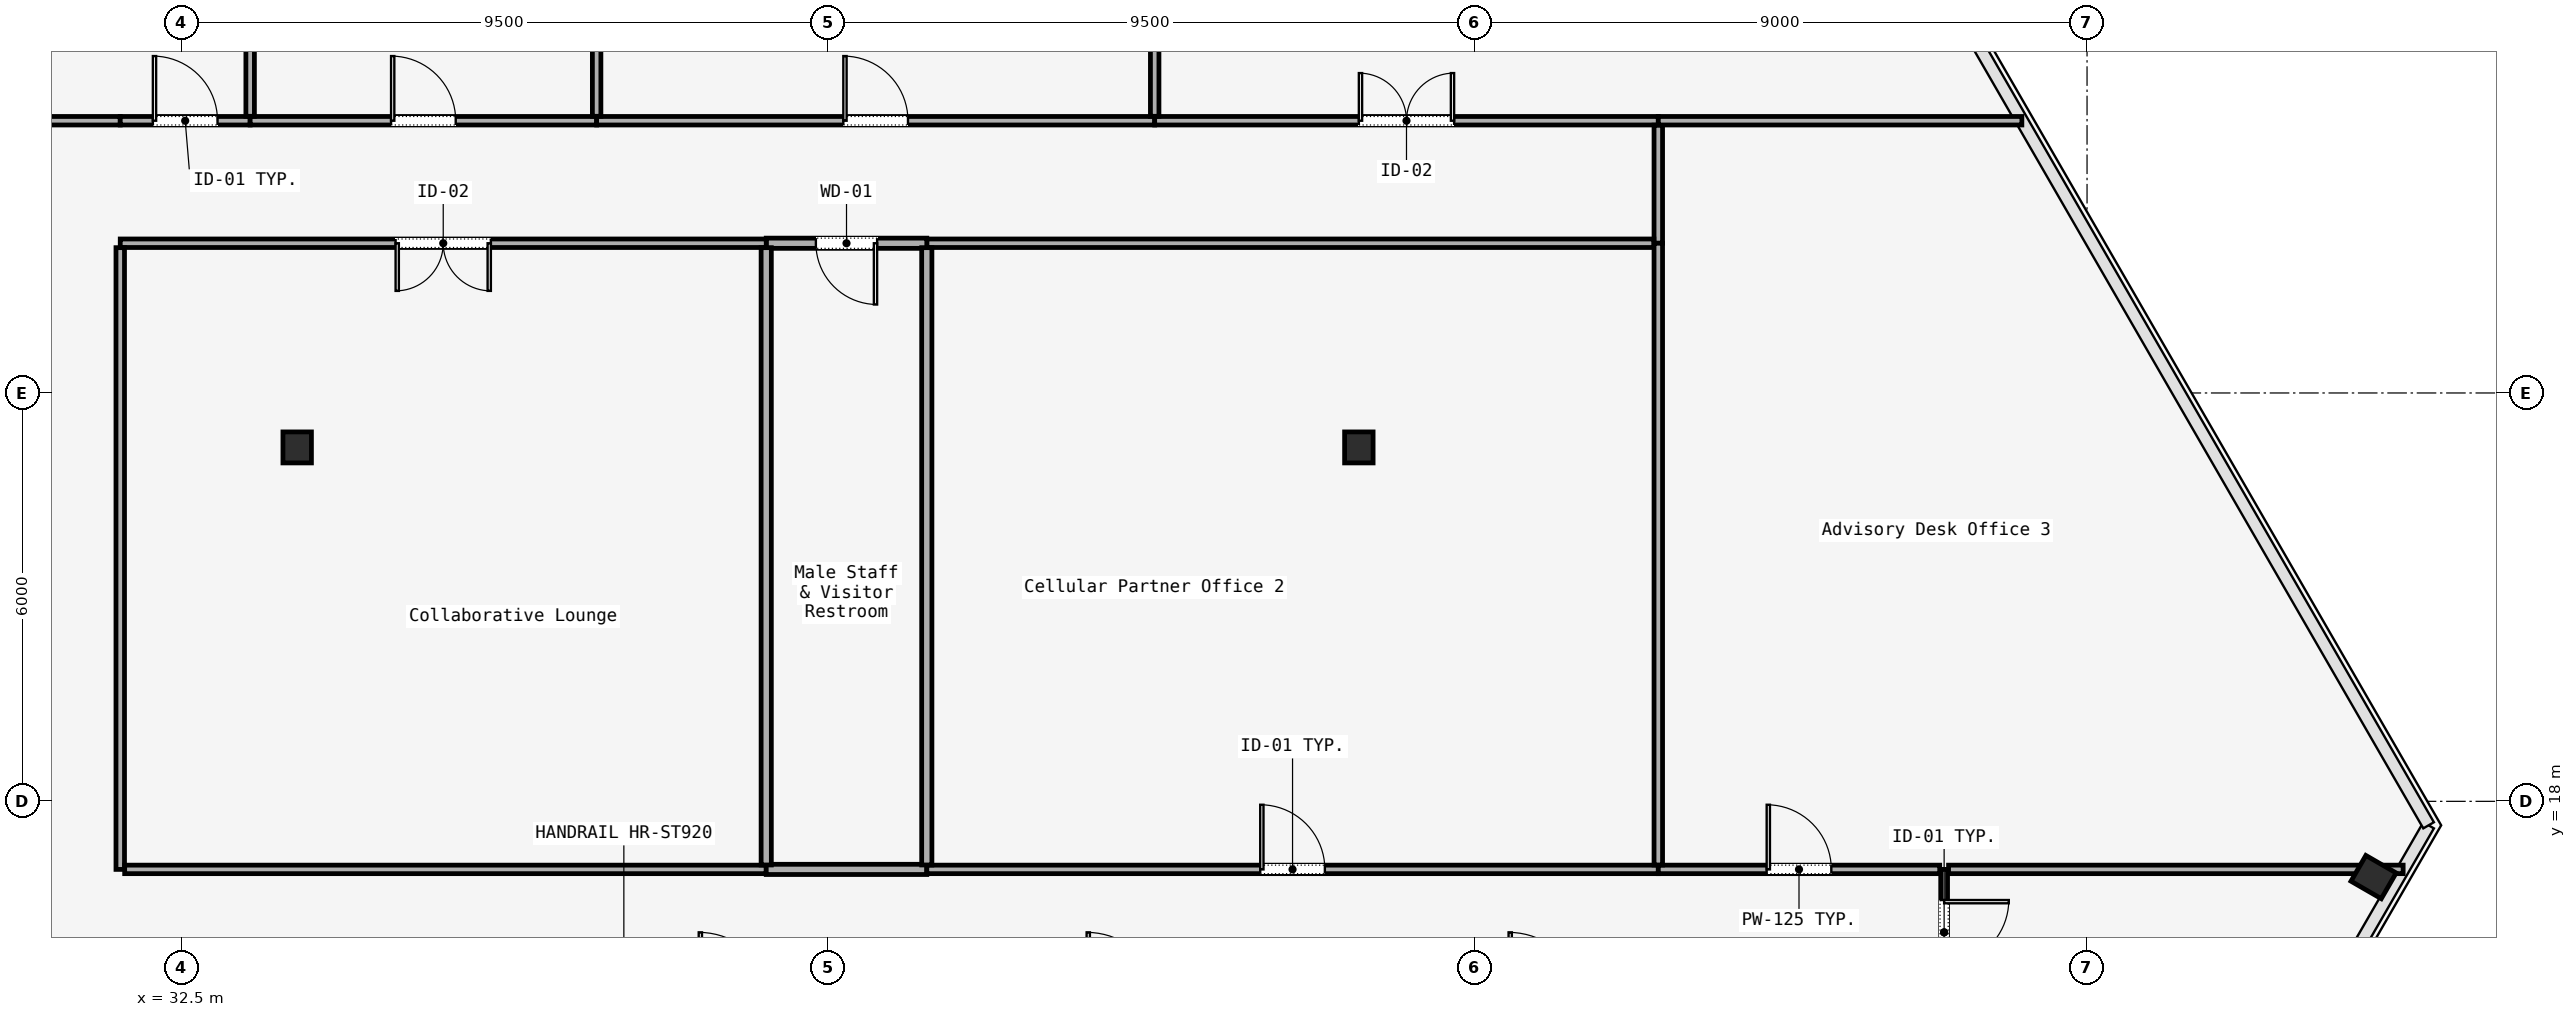
"""IFC4 building model, lengths in metres.
Left out: names, types, materials, properties, quantities, classifications, styles, units other than length and angle.
Written with IfcOpenShell. Run it as: python <this file> out.ifc"""

import sys

from ifc_helpers import new_model, si_unit, direction, frame, frame_2d, origin, origin_2d, place, context, subcontext, project, spatial, rectangle, i_section, extrude, element, fill, save


model = new_model("IFC4")
c1 = context("Model", 3, precision=1e-05, world=origin(), true_north=direction((0.0, 1.0)))
c2 = subcontext(c1, "Body", "Model", "MODEL_VIEW")
j1 = project(units=[si_unit("LENGTHUNIT", "METRE"), si_unit("PLANEANGLEUNIT", "RADIAN")], contexts=[c1])
p1 = place(None, origin())
s1 = spatial("IfcSite", under=j1, at=p1, CompositionType="ELEMENT")
p2 = place(p1, origin())
s2 = spatial("IfcBuilding", under=s1, at=p2, CompositionType="ELEMENT")
p3 = place(p2, frame((0.0, 0.0, 85.4)))
s3 = spatial("IfcBuildingStorey", under=s2, at=p3, CompositionType="ELEMENT", Elevation=85.4)
for number, where, z_axis, x_axis in (
    (1, (34.2, 23.2, 0.0), (0.0, 0.0, 1.0), (1.0, 0.0, 0.0)),
    (2, (49.8, 23.2, 0.0), (0.0, 0.0, 1.0), (1.0, 0.0, 0.0)),
):
    element("IfcColumn", number, at=place(p3, frame(where, z_axis=z_axis, x_axis=x_axis)), inside=s3, PredefinedType="COLUMN", context=c2, shape_type="SweptSolid", body=[
        extrude(i_section(OverallWidth=0.418, OverallDepth=0.456, WebThickness=0.042, FlangeThickness=0.067, FilletRadius=0.015, at=origin_2d()), origin(), (0.0, 0.0, 1.0), 3.58),
    ])
p4 = place(p3, frame((64.71, 16.887, 0.0), z_axis=(0.0, 0.0, 1.0), x_axis=(0.5, 0.866025403784, 0.0)))
e3 = element("IfcColumn", 3, at=p4, inside=s3, PredefinedType="COLUMN", context=c2, shape_type="SweptSolid", body=[
    extrude(i_section(OverallWidth=0.437, OverallDepth=0.514, WebThickness=0.061, FlangeThickness=0.077, FilletRadius=0.015, at=origin_2d()), origin(), (0.0, 0.0, 1.0), 3.58),
])
p5 = place(p3, frame((58.4, 17.0, 0.0), z_axis=(0.0, 0.0, 1.0), x_axis=(0.0, -1.0, 0.0)))
e4 = element("IfcWall", 4, at=p5, inside=s3, PredefinedType="MOVABLE", context=c2, shape_type="SweptSolid", body=[
    extrude(rectangle(XDim=1.85, YDim=0.1, at=frame_2d((0.925, 0.0))), origin(), (0.0, 0.0, 1.0), 2.95),
])
p6 = place(p5, frame((0.45, 0.0, 0.0)))
e5 = element("IfcOpeningElement", 5, at=p6, cuts=e4, PredefinedType="OPENING", context=c2, shape_type="SweptSolid", body=[
    extrude(rectangle(XDim=0.95, YDim=2.2, at=frame_2d((0.475, 1.1))), frame((0.0, 0.05, 0.0), z_axis=(0.0, -1.0, 0.0), x_axis=(1.0, 0.0, 0.0)), (0.0, 0.0, 1.0), 0.1),
])
p7 = place(p3, frame((29.865, 28.0, 0.0), z_axis=(0.0, 0.0, 1.0), x_axis=(1.0, 0.0, 0.0)))
e6 = element("IfcWall", 6, at=p7, inside=s3, PredefinedType="PARTITIONING", context=c2, shape_type="SweptSolid", body=[
    extrude(rectangle(XDim=1.735, YDim=0.125, at=frame_2d((0.868, 0.0))), origin(), (0.0, 0.0, 1.0), 2.95),
])
p8 = place(p3, frame((31.6, 28.0, 0.0), z_axis=(0.0, 0.0, 1.0), x_axis=(1.0, 0.0, 0.0)))
e7 = element("IfcWall", 7, at=p8, inside=s3, PredefinedType="PARTITIONING", context=c2, shape_type="SweptSolid", body=[
    extrude(rectangle(XDim=1.909, YDim=0.125, at=frame_2d((0.954, 0.0))), origin(), (0.0, 0.0, 1.0), 2.95),
])
p9 = place(p8, frame((0.479, 0.0, 0.0)))
e8 = element("IfcOpeningElement", 8, at=p9, cuts=e7, PredefinedType="OPENING", context=c2, shape_type="SweptSolid", body=[
    extrude(rectangle(XDim=0.95, YDim=2.2, at=frame_2d((0.475, 1.1))), frame((0.0, 0.062, 0.0), z_axis=(0.0, -1.0, 0.0), x_axis=(1.0, 0.0, 0.0)), (0.0, 0.0, 1.0), 0.125),
])
p10 = place(p3, frame((33.509, 28.0, 0.0), z_axis=(0.0, 0.0, 1.0), x_axis=(1.0, 0.0, 0.0)))
e9 = element("IfcWall", 9, at=p10, inside=s3, PredefinedType="PARTITIONING", context=c2, shape_type="SweptSolid", body=[
    extrude(rectangle(XDim=5.091, YDim=0.125, at=frame_2d((2.546, 0.0))), origin(), (0.0, 0.0, 1.0), 2.95),
])
p11 = place(p10, frame((2.071, 0.0, 0.0)))
e10 = element("IfcOpeningElement", 10, at=p11, cuts=e9, PredefinedType="OPENING", context=c2, shape_type="SweptSolid", body=[
    extrude(rectangle(XDim=0.95, YDim=2.2, at=frame_2d((0.475, 1.1))), frame((0.0, 0.062, 0.0), z_axis=(0.0, -1.0, 0.0), x_axis=(1.0, 0.0, 0.0)), (0.0, 0.0, 1.0), 0.125),
])
p12 = place(p3, frame((38.6, 28.0, 0.0), z_axis=(0.0, 0.0, 1.0), x_axis=(1.0, 0.0, 0.0)))
e11 = element("IfcWall", 11, at=p12, inside=s3, PredefinedType="PARTITIONING", context=c2, shape_type="SweptSolid", body=[
    extrude(rectangle(XDim=8.2, YDim=0.125, at=frame_2d((4.1, 0.0))), origin(), (0.0, 0.0, 1.0), 2.95),
])
p13 = place(p12, frame((3.625, 0.0, 0.0)))
e12 = element("IfcOpeningElement", 12, at=p13, cuts=e11, PredefinedType="OPENING", context=c2, shape_type="SweptSolid", body=[
    extrude(rectangle(XDim=0.95, YDim=2.2, at=frame_2d((0.475, 1.1))), frame((0.0, 0.062, 0.0), z_axis=(0.0, -1.0, 0.0), x_axis=(1.0, 0.0, 0.0)), (0.0, 0.0, 1.0), 0.125),
])
p14 = place(p3, frame((46.8, 28.0, 0.0), z_axis=(0.0, 0.0, 1.0), x_axis=(1.0, 0.0, 0.0)))
e13 = element("IfcWall", 13, at=p14, inside=s3, PredefinedType="PARTITIONING", context=c2, shape_type="SweptSolid", body=[
    extrude(rectangle(XDim=7.4, YDim=0.125, at=frame_2d((3.7, 0.0))), origin(), (0.0, 0.0, 1.0), 2.95),
])
p15 = place(p14, frame((3.0, 0.0, 0.0)))
e14 = element("IfcOpeningElement", 14, at=p15, cuts=e13, PredefinedType="OPENING", context=c2, shape_type="SweptSolid", body=[
    extrude(rectangle(XDim=1.4, YDim=2.2, at=frame_2d((0.7, 1.1))), frame((0.0, 0.062, 0.0), z_axis=(0.0, -1.0, 0.0), x_axis=(1.0, 0.0, 0.0)), (0.0, 0.0, 1.0), 0.125),
])
p16 = place(p3, frame((54.2, 27.935, 0.0), z_axis=(0.0, 0.0, 1.0), x_axis=(0.0, -1.0, 0.0)))
e15 = element("IfcWall", 15, at=p16, inside=s3, PredefinedType="PARTITIONING", context=c2, shape_type="SweptSolid", body=[
    extrude(rectangle(XDim=1.735, YDim=0.125, at=frame_2d((0.868, 0.0))), origin(), (0.0, 0.0, 1.0), 2.95),
])
p17 = place(p3, frame((54.135, 26.2, 0.0), z_axis=(0.0, 0.0, 1.0), x_axis=(-1.0, 0.0, 0.0)))
e16 = element("IfcWall", 16, at=p17, inside=s3, PredefinedType="PARTITIONING", context=c2, shape_type="SweptSolid", body=[
    extrude(rectangle(XDim=10.684, YDim=0.125, at=frame_2d((5.342, 0.0))), origin(), (0.0, 0.0, 1.0), 2.95),
])
p18 = place(p3, frame((43.451, 26.2, 0.0), z_axis=(0.0, 0.0, 1.0), x_axis=(-1.0, 0.0, 0.0)))
e17 = element("IfcWall", 17, at=p18, inside=s3, PredefinedType="PARTITIONING", context=c2, shape_type="SweptSolid", body=[
    extrude(rectangle(XDim=2.359, YDim=0.15, at=frame_2d((1.18, 0.0))), origin(), (0.0, 0.0, 1.0), 2.95),
])
p19 = place(p18, frame((0.73, 0.0, 0.0)))
e18 = element("IfcOpeningElement", 18, at=p19, cuts=e17, PredefinedType="OPENING", context=c2, shape_type="SweptSolid", body=[
    extrude(rectangle(XDim=0.9, YDim=2.15, at=frame_2d((0.45, 1.075))), frame((0.0, 0.075, 0.0), z_axis=(0.0, -1.0, 0.0), x_axis=(1.0, 0.0, 0.0)), (0.0, 0.0, 1.0), 0.15),
])
p20 = place(p3, frame((41.092, 26.2, 0.0), z_axis=(0.0, 0.0, 1.0), x_axis=(-1.0, 0.0, 0.0)))
e19 = element("IfcWall", 19, at=p20, inside=s3, PredefinedType="PARTITIONING", context=c2, shape_type="SweptSolid", body=[
    extrude(rectangle(XDim=9.492, YDim=0.125, at=frame_2d((4.746, 0.0))), origin(), (0.0, 0.0, 1.0), 2.95),
])
p21 = place(p20, frame((4.046, 0.0, 0.0)))
e20 = element("IfcOpeningElement", 20, at=p21, cuts=e19, PredefinedType="OPENING", context=c2, shape_type="SweptSolid", body=[
    extrude(rectangle(XDim=1.4, YDim=2.2, at=frame_2d((0.7, 1.1))), frame((0.0, 0.062, 0.0), z_axis=(0.0, -1.0, 0.0), x_axis=(1.0, 0.0, 0.0)), (0.0, 0.0, 1.0), 0.125),
])
p22 = place(p3, frame((31.6, 26.135, 0.0), z_axis=(0.0, 0.0, 1.0), x_axis=(0.0, -1.0, 0.0)))
e21 = element("IfcWall", 21, at=p22, inside=s3, PredefinedType="PARTITIONING", context=c2, shape_type="SweptSolid", body=[
    extrude(rectangle(XDim=9.135, YDim=0.125, at=frame_2d((4.567, 0.0))), origin(), (0.0, 0.0, 1.0), 2.95),
])
p23 = place(p3, frame((31.665, 17.0, 0.0), z_axis=(0.0, 0.0, 1.0), x_axis=(1.0, 0.0, 0.0)))
e22 = element("IfcWall", 22, at=p23, inside=s3, PredefinedType="PARTITIONING", context=c2, shape_type="SweptSolid", body=[
    extrude(rectangle(XDim=9.427, YDim=0.125, at=frame_2d((4.713, 0.0))), origin(), (0.0, 0.0, 1.0), 2.95),
])
p24 = place(p3, frame((41.092, 17.0, 0.0), z_axis=(0.0, 0.0, 1.0), x_axis=(1.0, 0.0, 0.0)))
e23 = element("IfcWall", 23, at=p24, inside=s3, PredefinedType="PARTITIONING", context=c2, shape_type="SweptSolid", body=[
    extrude(rectangle(XDim=2.359, YDim=0.15, at=frame_2d((1.18, 0.0))), origin(), (0.0, 0.0, 1.0), 2.95),
])
p25 = place(p3, frame((43.451, 17.0, 0.0), z_axis=(0.0, 0.0, 1.0), x_axis=(1.0, 0.0, 0.0)))
e24 = element("IfcWall", 24, at=p25, inside=s3, PredefinedType="PARTITIONING", context=c2, shape_type="SweptSolid", body=[
    extrude(rectangle(XDim=10.749, YDim=0.125, at=frame_2d((5.374, 0.0))), origin(), (0.0, 0.0, 1.0), 2.95),
])
p26 = place(p25, frame((4.899, 0.0, 0.0)))
e25 = element("IfcOpeningElement", 25, at=p26, cuts=e24, PredefinedType="OPENING", context=c2, shape_type="SweptSolid", body=[
    extrude(rectangle(XDim=0.95, YDim=2.2, at=frame_2d((0.475, 1.1))), frame((0.0, 0.062, 0.0), z_axis=(0.0, -1.0, 0.0), x_axis=(1.0, 0.0, 0.0)), (0.0, 0.0, 1.0), 0.125),
])
p27 = place(p3, frame((54.2, 17.0, 0.0), z_axis=(0.0, 0.0, 1.0), x_axis=(1.0, 0.0, 0.0)))
e26 = element("IfcWall", 26, at=p27, inside=s3, PredefinedType="PARTITIONING", context=c2, shape_type="SweptSolid", body=[
    extrude(rectangle(XDim=4.135, YDim=0.125, at=frame_2d((2.067, 0.0))), origin(), (0.0, 0.0, 1.0), 2.95),
])
p28 = place(p27, frame((1.593, 0.0, 0.0)))
e27 = element("IfcOpeningElement", 27, at=p28, cuts=e26, PredefinedType="OPENING", context=c2, shape_type="SweptSolid", body=[
    extrude(rectangle(XDim=0.95, YDim=2.2, at=frame_2d((0.475, 1.1))), frame((0.0, 0.062, 0.0), z_axis=(0.0, -1.0, 0.0), x_axis=(1.0, 0.0, 0.0)), (0.0, 0.0, 1.0), 0.125),
])
p29 = place(p3, frame((58.465, 17.0, 0.0), z_axis=(0.0, 0.0, 1.0), x_axis=(1.0, 0.0, 0.0)))
e28 = element("IfcWall", 28, at=p29, inside=s3, PredefinedType="PARTITIONING", context=c2, shape_type="SweptSolid", body=[
    extrude(rectangle(XDim=6.68, YDim=0.125, at=frame_2d((3.34, 0.0))), origin(), (0.0, 0.0, 1.0), 2.95),
])
for number, where, z_axis, x_axis in (
    (29, (41.092, 26.135, 0.0), (0.0, 0.0, 1.0), (0.0, -1.0, 0.0)),
    (30, (43.451, 26.135, 0.0), (0.0, 0.0, 1.0), (0.0, -1.0, 0.0)),
):
    element("IfcWall", number, at=place(p3, frame(where, z_axis=z_axis, x_axis=x_axis)), inside=s3, PredefinedType="PARTITIONING", context=c2, shape_type="SweptSolid", body=[
        extrude(rectangle(XDim=9.07, YDim=0.15, at=frame_2d((4.535, 0.0))), origin(), (0.0, 0.0, 1.0), 2.95),
    ])
p30 = place(p3, frame((54.2, 26.2, 0.0), z_axis=(0.0, 0.0, 1.0), x_axis=(0.0, -1.0, 0.0)))
e31 = element("IfcWall", 31, at=p30, inside=s3, PredefinedType="PARTITIONING", context=c2, shape_type="SweptSolid", body=[
    extrude(rectangle(XDim=9.135, YDim=0.125, at=frame_2d((4.567, 0.0))), origin(), (0.0, 0.0, 1.0), 2.95),
])
p31 = place(p3, frame((54.2, 28.0, 0.0), z_axis=(0.0, 0.0, 1.0), x_axis=(1.0, 0.0, 0.0)))
e32 = element("IfcWall", 32, at=p31, inside=s3, PredefinedType="PARTITIONING", context=c2, shape_type="SweptSolid", body=[
    extrude(rectangle(XDim=5.342, YDim=0.125, at=frame_2d((2.671, 0.0))), origin(), (0.0, 0.0, 1.0), 2.95),
])
p32 = place(p3, frame((33.509, 43.677, 0.0), z_axis=(0.0, 0.0, 1.0), x_axis=(0.0, -1.0, 0.0)))
e33 = element("IfcWall", 33, at=p32, inside=s3, PredefinedType="PARTITIONING", context=c2, shape_type="SweptSolid", body=[
    extrude(rectangle(XDim=15.612, YDim=0.125, at=frame_2d((7.806, 0.0))), origin(), (0.0, 0.0, 1.0), 2.95),
])
for number, where, z_axis, x_axis in (
    (34, (46.8, 28.065, 0.0), (0.0, 0.0, 1.0), (0.0, 1.0, 0.0)),
    (35, (38.6, 45.896, 0.0), (0.0, 0.0, 1.0), (0.0, -1.0, 0.0)),
):
    element("IfcWall", number, at=place(p3, frame(where, z_axis=z_axis, x_axis=x_axis)), inside=s3, PredefinedType="PARTITIONING", context=c2, shape_type="SweptSolid", body=[
        extrude(rectangle(XDim=17.831, YDim=0.125, at=frame_2d((8.916, 0.0))), origin(), (0.0, 0.0, 1.0), 2.95),
    ])
p33 = place(p6, origin())
e36 = element("IfcDoor", 36, at=p33, inside=s3, OperationType="SINGLE_SWING_LEFT", PredefinedType="DOOR", context=c2, shape_type="SweptSolid", body=[
    extrude(rectangle(XDim=0.95, YDim=2.2, at=frame_2d((0.475, 1.1))), frame((0.0, 0.025, 0.0), z_axis=(0.0, -1.0, 0.0), x_axis=(1.0, 0.0, 0.0)), (0.0, 0.0, 1.0), 0.05),
])
fill(e5, e36)
p34 = place(p21, origin())
e37 = element("IfcDoor", 37, at=p34, inside=s3, OperationType="SINGLE_SWING_LEFT", PredefinedType="DOOR", context=c2, shape_type="SweptSolid", body=[
    extrude(rectangle(XDim=1.4, YDim=2.2, at=frame_2d((0.7, 1.1))), frame((0.0, 0.025, 0.0), z_axis=(0.0, -1.0, 0.0), x_axis=(1.0, 0.0, 0.0)), (0.0, 0.0, 1.0), 0.05),
])
fill(e20, e37)
p35 = place(p19, origin())
e38 = element("IfcDoor", 38, at=p35, inside=s3, OperationType="SINGLE_SWING_RIGHT", PredefinedType="DOOR", context=c2, shape_type="SweptSolid", body=[
    extrude(rectangle(XDim=0.9, YDim=2.15, at=frame_2d((0.45, 1.075))), frame((0.0, 0.025, 0.0), z_axis=(0.0, -1.0, 0.0), x_axis=(1.0, 0.0, 0.0)), (0.0, 0.0, 1.0), 0.05),
])
fill(e18, e38)
p36 = place(p26, origin())
e39 = element("IfcDoor", 39, at=p36, inside=s3, OperationType="SINGLE_SWING_LEFT", PredefinedType="DOOR", context=c2, shape_type="SweptSolid", body=[
    extrude(rectangle(XDim=0.95, YDim=2.2, at=frame_2d((0.475, 1.1))), frame((0.0, 0.025, 0.0), z_axis=(0.0, -1.0, 0.0), x_axis=(1.0, 0.0, 0.0)), (0.0, 0.0, 1.0), 0.05),
])
fill(e25, e39)
p37 = place(p28, origin())
e40 = element("IfcDoor", 40, at=p37, inside=s3, OperationType="SINGLE_SWING_RIGHT", PredefinedType="DOOR", context=c2, shape_type="SweptSolid", body=[
    extrude(rectangle(XDim=0.95, YDim=2.2, at=frame_2d((0.475, 1.1))), frame((0.0, 0.025, 0.0), z_axis=(0.0, -1.0, 0.0), x_axis=(1.0, 0.0, 0.0)), (0.0, 0.0, 1.0), 0.05),
])
fill(e27, e40)
p38 = place(p9, origin())
e41 = element("IfcDoor", 41, at=p38, inside=s3, OperationType="SINGLE_SWING_RIGHT", PredefinedType="DOOR", context=c2, shape_type="SweptSolid", body=[
    extrude(rectangle(XDim=0.95, YDim=2.2, at=frame_2d((0.475, 1.1))), frame((0.0, 0.025, 0.0), z_axis=(0.0, -1.0, 0.0), x_axis=(1.0, 0.0, 0.0)), (0.0, 0.0, 1.0), 0.05),
])
fill(e8, e41)
p39 = place(p15, origin())
e42 = element("IfcDoor", 42, at=p39, inside=s3, OperationType="SINGLE_SWING_LEFT", PredefinedType="DOOR", context=c2, shape_type="SweptSolid", body=[
    extrude(rectangle(XDim=1.4, YDim=2.2, at=frame_2d((0.7, 1.1))), frame((0.0, 0.025, 0.0), z_axis=(0.0, -1.0, 0.0), x_axis=(1.0, 0.0, 0.0)), (0.0, 0.0, 1.0), 0.05),
])
fill(e14, e42)
p40 = place(p11, origin())
e43 = element("IfcDoor", 43, at=p40, inside=s3, OperationType="SINGLE_SWING_RIGHT", PredefinedType="DOOR", context=c2, shape_type="SweptSolid", body=[
    extrude(rectangle(XDim=0.95, YDim=2.2, at=frame_2d((0.475, 1.1))), frame((0.0, 0.025, 0.0), z_axis=(0.0, -1.0, 0.0), x_axis=(1.0, 0.0, 0.0)), (0.0, 0.0, 1.0), 0.05),
])
fill(e10, e43)
p41 = place(p13, origin())
e44 = element("IfcDoor", 44, at=p41, inside=s3, OperationType="SINGLE_SWING_LEFT", PredefinedType="DOOR", context=c2, shape_type="SweptSolid", body=[
    extrude(rectangle(XDim=0.95, YDim=2.2, at=frame_2d((0.475, 1.1))), frame((0.0, 0.025, 0.0), z_axis=(0.0, -1.0, 0.0), x_axis=(1.0, 0.0, 0.0)), (0.0, 0.0, 1.0), 0.05),
])
fill(e12, e44)
save(model, sys.argv[1])
